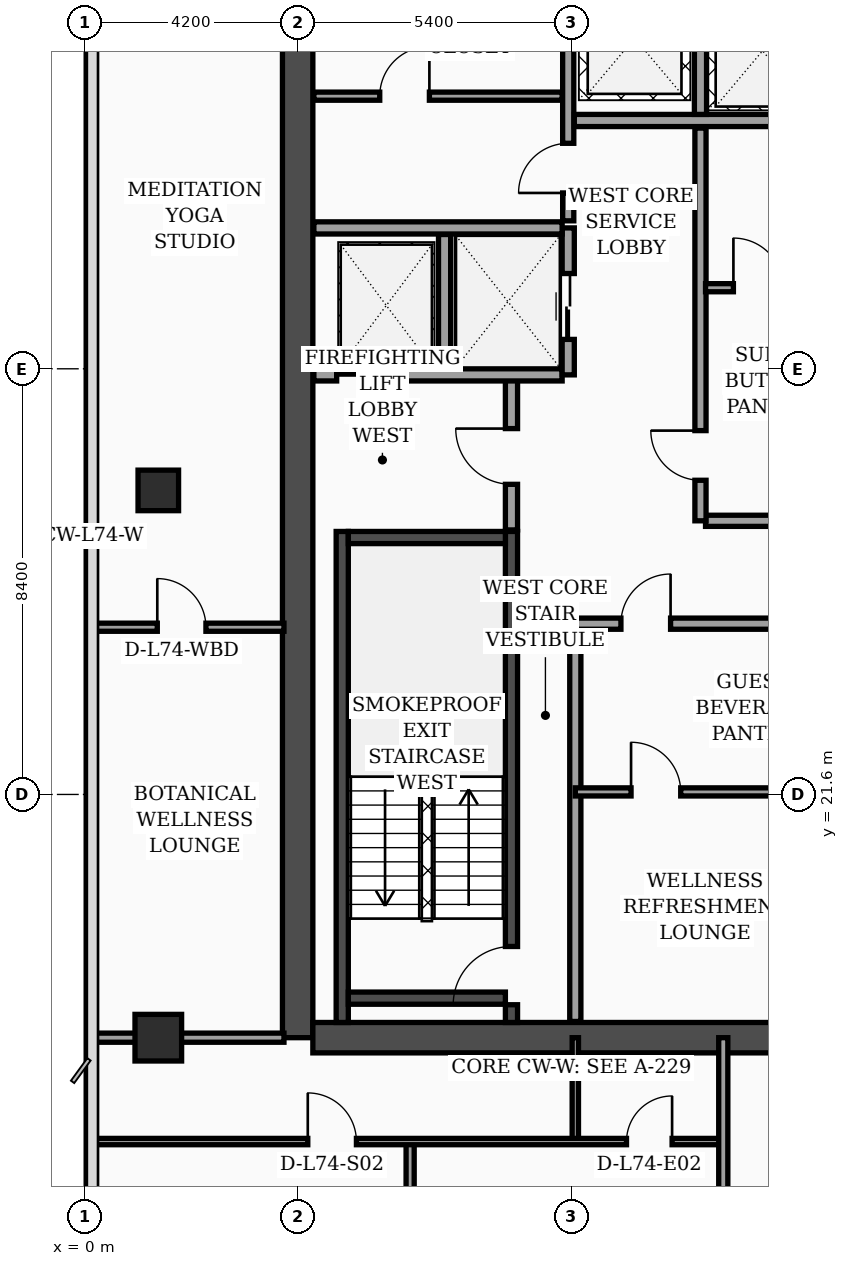
"""IFC4 building model, lengths in metres.
Left out: names, types, materials, properties, quantities, classifications, styles, units other than length and angle.
Written with IfcOpenShell. Run it as: python <this file> out.ifc"""

import sys

from ifc_helpers import new_model, si_unit, direction, frame, frame_2d, origin, origin_2d, place, context, subcontext, project, spatial, rectangle, extrude, element, fill, save


model = new_model("IFC4")
c1 = context("Model", 3, precision=1e-05, world=origin(), true_north=direction((0.0, 1.0)))
c2 = subcontext(c1, "Body", "Model", "MODEL_VIEW")
j1 = project(units=[si_unit("LENGTHUNIT", "METRE"), si_unit("PLANEANGLEUNIT", "RADIAN")], contexts=[c1])
p1 = place(None, origin())
s1 = spatial("IfcSite", under=j1, at=p1, CompositionType="ELEMENT")
p2 = place(p1, origin())
s2 = spatial("IfcBuilding", under=s1, at=p2, CompositionType="ELEMENT")
p3 = place(p2, frame((0.0, 0.0, 298.7)))
s3 = spatial("IfcBuildingStorey", under=s2, at=p3, CompositionType="ELEMENT", Elevation=298.7)
p4 = place(p3, frame((4.2, 16.8, 0.0), z_axis=(0.0, 0.0, 1.0), x_axis=(0.0, 1.0, 0.0)))
e1 = element("IfcWall", 1, at=p4, inside=s3, PredefinedType="SHEAR", context=c2, shape_type="SweptSolid", body=[
    extrude(rectangle(XDim=21.6, YDim=0.6, at=frame_2d((10.8, 0.0))), origin(), (0.0, 0.0, 1.0), 3.56),
])
p5 = place(p3, frame((4.5, 16.8, 0.0), z_axis=(0.0, 0.0, 1.0), x_axis=(1.0, 0.0, 0.0)))
e2 = element("IfcWall", 2, at=p5, inside=s3, PredefinedType="SHEAR", context=c2, shape_type="SweptSolid", body=[
    extrude(rectangle(XDim=10.2, YDim=0.6, at=frame_2d((5.1, 0.0))), origin(), (0.0, 0.0, 1.0), 3.56),
])
p6 = place(p3, frame((5.08, 17.1, 0.0), z_axis=(0.0, 0.0, 1.0), x_axis=(0.0, 1.0, 0.0)))
e3 = element("IfcWall", 3, at=p6, inside=s3, PredefinedType="SOLIDWALL", context=c2, shape_type="SweptSolid", body=[
    extrude(rectangle(XDim=9.69, YDim=0.24, at=frame_2d((4.845, 0.0))), origin(), (0.0, 0.0, 1.0), 3.56),
])
p7 = place(p3, frame((8.42, 17.1, 0.0), z_axis=(0.0, 0.0, 1.0), x_axis=(0.0, 1.0, 0.0)))
e4 = element("IfcWall", 4, at=p7, inside=s3, PredefinedType="SOLIDWALL", context=c2, shape_type="SweptSolid", body=[
    extrude(rectangle(XDim=9.69, YDim=0.24, at=frame_2d((4.845, 0.0))), origin(), (0.0, 0.0, 1.0), 3.56),
])
p8 = place(p7, frame((0.35, 0.0, 0.0)))
e5 = element("IfcOpeningElement", 5, at=p8, cuts=e4, PredefinedType="OPENING", context=c2, shape_type="SweptSolid", body=[
    extrude(rectangle(XDim=1.15, YDim=2.2, at=frame_2d((0.575, 1.1))), frame((0.0, 0.13, 0.0), z_axis=(0.0, -1.0, 0.0), x_axis=(1.0, 0.0, 0.0)), (0.0, 0.0, 1.0), 0.26),
])
for number, where, z_axis, x_axis in (
    (6, (5.2, 17.58, 0.0), (0.0, 0.0, 1.0), (1.0, 0.0, 0.0)),
    (7, (5.2, 26.67, 0.0), (0.0, 0.0, 1.0), (1.0, 0.0, 0.0)),
):
    element("IfcWall", number, at=place(p3, frame(where, z_axis=z_axis, x_axis=x_axis)), inside=s3, PredefinedType="SOLIDWALL", context=c2, shape_type="SweptSolid", body=[
        extrude(rectangle(XDim=3.1, YDim=0.24, at=frame_2d((1.55, 0.0))), origin(), (0.0, 0.0, 1.0), 3.56),
    ])
p9 = place(p3, frame((1.45, 16.8, 0.0), z_axis=(0.0, 0.0, 1.0), x_axis=(1.0, 0.0, 0.0)))
e8 = element("IfcColumn", 8, at=p9, inside=s3, PredefinedType="COLUMN", context=c2, shape_type="SweptSolid", body=[
    extrude(rectangle(XDim=0.92, YDim=0.92, at=origin_2d()), origin(), (0.0, 0.0, 1.0), 3.56),
])
p10 = place(p3, frame((1.45, 27.6, 0.0), z_axis=(0.0, 0.0, 1.0), x_axis=(1.0, 0.0, 0.0)))
e9 = element("IfcColumn", 9, at=p10, inside=s3, PredefinedType="COLUMN", context=c2, shape_type="SweptSolid", body=[
    extrude(rectangle(XDim=0.8, YDim=0.8, at=origin_2d()), origin(), (0.0, 0.0, 1.0), 3.56),
])
p11 = place(p3, frame((8.42, 26.82, 0.0), z_axis=(0.0, 0.0, 1.0), x_axis=(0.0, 1.0, 0.0)))
e10 = element("IfcWall", 10, at=p11, inside=s3, PredefinedType="SOLIDWALL", context=c2, shape_type="SweptSolid", body=[
    extrude(rectangle(XDim=3.0, YDim=0.24, at=frame_2d((1.5, 0.0))), origin(), (0.0, 0.0, 1.0), 3.56),
])
p12 = place(p11, frame((0.9, 0.0, 0.0)))
e11 = element("IfcOpeningElement", 11, at=p12, cuts=e10, PredefinedType="OPENING", context=c2, shape_type="SweptSolid", body=[
    extrude(rectangle(XDim=1.1, YDim=2.2, at=frame_2d((0.55, 1.1))), frame((0.0, 0.13, 0.0), z_axis=(0.0, -1.0, 0.0), x_axis=(1.0, 0.0, 0.0)), (0.0, 0.0, 1.0), 0.26),
])
p13 = place(p3, frame((4.52, 29.88, 0.0), z_axis=(0.0, 0.0, 1.0), x_axis=(1.0, 0.0, 0.0)))
e12 = element("IfcWall", 12, at=p13, inside=s3, PredefinedType="SOLIDWALL", context=c2, shape_type="SweptSolid", body=[
    extrude(rectangle(XDim=4.9, YDim=0.24, at=frame_2d((2.45, 0.0))), origin(), (0.0, 0.0, 1.0), 3.56),
])
p14 = place(p13, frame((0.45, 0.0, 0.0)))
e13 = element("IfcOpeningElement", 13, at=p14, cuts=e12, PredefinedType="OPENING", context=c2, shape_type="SweptSolid", body=[
    extrude(rectangle(XDim=1.3, YDim=2.35, at=frame_2d((0.65, 1.175))), frame((0.0, 0.13, 0.0), z_axis=(0.0, -1.0, 0.0), x_axis=(1.0, 0.0, 0.0)), (0.0, 0.0, 1.0), 0.26),
])
p15 = place(p3, frame((7.1, 30.02, 0.0), z_axis=(0.0, 0.0, 1.0), x_axis=(0.0, 1.0, 0.0)))
e14 = element("IfcWall", 14, at=p15, inside=s3, PredefinedType="SOLIDWALL", context=c2, shape_type="SweptSolid", body=[
    extrude(rectangle(XDim=2.63, YDim=0.24, at=frame_2d((1.315, 0.0))), origin(), (0.0, 0.0, 1.0), 3.56),
])
p16 = place(p3, frame((9.54, 29.88, 0.0), z_axis=(0.0, 0.0, 1.0), x_axis=(0.0, 1.0, 0.0)))
e15 = element("IfcWall", 15, at=p16, inside=s3, PredefinedType="SOLIDWALL", context=c2, shape_type="SweptSolid", body=[
    extrude(rectangle(XDim=2.9, YDim=0.24, at=frame_2d((1.45, 0.0))), origin(), (0.0, 0.0, 1.0), 3.56),
])
p17 = place(p16, frame((0.7, 0.0, 0.0)))
e16 = element("IfcOpeningElement", 16, at=p17, cuts=e15, PredefinedType="OPENING", context=c2, shape_type="SweptSolid", body=[
    extrude(rectangle(XDim=1.3, YDim=2.35, at=frame_2d((0.65, 1.175))), frame((0.0, 0.13, 0.0), z_axis=(0.0, -1.0, 0.0), x_axis=(1.0, 0.0, 0.0)), (0.0, 0.0, 1.0), 0.26),
])
p18 = place(p3, frame((4.52, 32.78, 0.0), z_axis=(0.0, 0.0, 1.0), x_axis=(1.0, 0.0, 0.0)))
e17 = element("IfcWall", 17, at=p18, inside=s3, PredefinedType="SOLIDWALL", context=c2, shape_type="SweptSolid", body=[
    extrude(rectangle(XDim=4.9, YDim=0.24, at=frame_2d((2.45, 0.0))), origin(), (0.0, 0.0, 1.0), 3.19),
])
p19 = place(p3, frame((9.68, 17.12, 0.0), z_axis=(0.0, 0.0, 1.0), x_axis=(0.0, 1.0, 0.0)))
e18 = element("IfcWall", 18, at=p19, inside=s3, PredefinedType="SOLIDWALL", context=c2, shape_type="SweptSolid", body=[
    extrude(rectangle(XDim=7.88, YDim=0.22, at=frame_2d((3.94, 0.0))), origin(), (0.0, 0.0, 1.0), 3.56),
])
p20 = place(p3, frame((4.52, 35.38, 0.0), z_axis=(0.0, 0.0, 1.0), x_axis=(1.0, 0.0, 0.0)))
e19 = element("IfcWall", 19, at=p20, inside=s3, PredefinedType="PARTITIONING", context=c2, shape_type="SweptSolid", body=[
    extrude(rectangle(XDim=4.9, YDim=0.16, at=frame_2d((2.45, 0.0))), origin(), (0.0, 0.0, 1.0), 3.56),
])
p21 = place(p20, frame((1.3, 0.0, 0.0)))
e20 = element("IfcOpeningElement", 20, at=p21, cuts=e19, PredefinedType="OPENING", context=c2, shape_type="SweptSolid", body=[
    extrude(rectangle(XDim=0.98, YDim=2.15, at=frame_2d((0.49, 1.075))), frame((0.0, 0.09, 0.0), z_axis=(0.0, -1.0, 0.0), x_axis=(1.0, 0.0, 0.0)), (0.0, 0.0, 1.0), 0.18),
])
p22 = place(p3, frame((9.54, 32.92, 0.0), z_axis=(0.0, 0.0, 1.0), x_axis=(0.0, 1.0, 0.0)))
e21 = element("IfcWall", 21, at=p22, inside=s3, PredefinedType="SOLIDWALL", context=c2, shape_type="SweptSolid", body=[
    extrude(rectangle(XDim=5.16, YDim=0.22, at=frame_2d((2.58, 0.0))), origin(), (0.0, 0.0, 1.0), 3.56),
])
p23 = place(p22, frame((0.55, 0.0, 0.0)))
e22 = element("IfcOpeningElement", 22, at=p23, cuts=e21, PredefinedType="OPENING", context=c2, shape_type="SweptSolid", body=[
    extrude(rectangle(XDim=0.98, YDim=2.15, at=frame_2d((0.49, 1.075))), frame((0.0, 0.12, 0.0), z_axis=(0.0, -1.0, 0.0), x_axis=(1.0, 0.0, 0.0)), (0.0, 0.0, 1.0), 0.24),
])
p24 = place(p3, frame((9.68, 21.65, 0.0), z_axis=(0.0, 0.0, 1.0), x_axis=(1.0, 0.0, 0.0)))
e23 = element("IfcWall", 23, at=p24, inside=s3, PredefinedType="PARTITIONING", context=c2, shape_type="SweptSolid", body=[
    extrude(rectangle(XDim=5.0, YDim=0.16, at=frame_2d((2.5, 0.0))), origin(), (0.0, 0.0, 1.0), 3.09),
])
p25 = place(p24, frame((1.1, 0.0, 0.0)))
e24 = element("IfcOpeningElement", 24, at=p25, cuts=e23, PredefinedType="OPENING", context=c2, shape_type="SweptSolid", body=[
    extrude(rectangle(XDim=0.98, YDim=2.15, at=frame_2d((0.49, 1.075))), frame((0.0, 0.09, 0.0), z_axis=(0.0, -1.0, 0.0), x_axis=(1.0, 0.0, 0.0)), (0.0, 0.0, 1.0), 0.18),
])
p26 = place(p3, frame((9.68, 24.97, 0.0), z_axis=(0.0, 0.0, 1.0), x_axis=(1.0, 0.0, 0.0)))
e25 = element("IfcWall", 25, at=p26, inside=s3, PredefinedType="SOLIDWALL", context=c2, shape_type="SweptSolid", body=[
    extrude(rectangle(XDim=5.0, YDim=0.22, at=frame_2d((2.5, 0.0))), origin(), (0.0, 0.0, 1.0), 2.99),
])
p27 = place(p26, frame((0.9, 0.0, 0.0)))
e26 = element("IfcOpeningElement", 26, at=p27, cuts=e25, PredefinedType="OPENING", context=c2, shape_type="SweptSolid", body=[
    extrude(rectangle(XDim=0.98, YDim=2.15, at=frame_2d((0.49, 1.075))), frame((0.0, 0.12, 0.0), z_axis=(0.0, -1.0, 0.0), x_axis=(1.0, 0.0, 0.0)), (0.0, 0.0, 1.0), 0.24),
])
p28 = place(p3, frame((12.25, 27.0, 0.0), z_axis=(0.0, 0.0, 1.0), x_axis=(1.0, 0.0, 0.0)))
e27 = element("IfcWall", 27, at=p28, inside=s3, PredefinedType="SOLIDWALL", context=c2, shape_type="SweptSolid", body=[
    extrude(rectangle(XDim=2.43, YDim=0.22, at=frame_2d((1.215, 0.0))), origin(), (0.0, 0.0, 1.0), 3.56),
])
p29 = place(p3, frame((12.15, 27.0, 0.0), z_axis=(0.0, 0.0, 1.0), x_axis=(0.0, 1.0, 0.0)))
e28 = element("IfcWall", 28, at=p29, inside=s3, PredefinedType="SOLIDWALL", context=c2, shape_type="SweptSolid", body=[
    extrude(rectangle(XDim=7.75, YDim=0.22, at=frame_2d((3.875, 0.0))), origin(), (0.0, 0.0, 1.0), 3.56),
])
p30 = place(p29, frame((0.8, 0.0, 0.0)))
e29 = element("IfcOpeningElement", 29, at=p30, cuts=e28, PredefinedType="OPENING", context=c2, shape_type="SweptSolid", body=[
    extrude(rectangle(XDim=0.98, YDim=2.15, at=frame_2d((0.49, 1.075))), frame((0.0, 0.12, 0.0), z_axis=(0.0, -1.0, 0.0), x_axis=(1.0, 0.0, 0.0)), (0.0, 0.0, 1.0), 0.24),
])
p31 = place(p3, frame((12.25, 31.6, 0.0), z_axis=(0.0, 0.0, 1.0), x_axis=(1.0, 0.0, 0.0)))
e30 = element("IfcWall", 30, at=p31, inside=s3, PredefinedType="PARTITIONING", context=c2, shape_type="SweptSolid", body=[
    extrude(rectangle(XDim=2.43, YDim=0.16, at=frame_2d((1.215, 0.0))), origin(), (0.0, 0.0, 1.0), 3.14),
])
p32 = place(p31, frame((0.55, 0.0, 0.0)))
e31 = element("IfcOpeningElement", 31, at=p32, cuts=e30, PredefinedType="OPENING", context=c2, shape_type="SweptSolid", body=[
    extrude(rectangle(XDim=0.98, YDim=2.15, at=frame_2d((0.49, 1.075))), frame((0.0, 0.09, 0.0), z_axis=(0.0, -1.0, 0.0), x_axis=(1.0, 0.0, 0.0)), (0.0, 0.0, 1.0), 0.18),
])
p33 = place(p3, frame((9.66, 34.9, 0.0), z_axis=(0.0, 0.0, 1.0), x_axis=(1.0, 0.0, 0.0)))
e32 = element("IfcWall", 32, at=p33, inside=s3, PredefinedType="SOLIDWALL", context=c2, shape_type="SweptSolid", body=[
    extrude(rectangle(XDim=5.02, YDim=0.24, at=frame_2d((2.51, 0.0))), origin(), (0.0, 0.0, 1.0), 3.56),
])
p34 = place(p3, frame((12.15, 35.02, 0.0), z_axis=(0.0, 0.0, 1.0), x_axis=(0.0, 1.0, 0.0)))
e33 = element("IfcWall", 33, at=p34, inside=s3, PredefinedType="SOLIDWALL", context=c2, shape_type="SweptSolid", body=[
    extrude(rectangle(XDim=3.06, YDim=0.24, at=frame_2d((1.53, 0.0))), origin(), (0.0, 0.0, 1.0), 3.56),
])
p35 = place(p3, frame((0.08, 24.9, 0.0), z_axis=(0.0, 0.0, 1.0), x_axis=(1.0, 0.0, 0.0)))
e34 = element("IfcWall", 34, at=p35, inside=s3, PredefinedType="PARTITIONING", context=c2, shape_type="SweptSolid", body=[
    extrude(rectangle(XDim=3.85, YDim=0.16, at=frame_2d((1.925, 0.0))), origin(), (0.0, 0.0, 1.0), 3.09),
])
p36 = place(p35, frame((1.35, 0.0, 0.0)))
e35 = element("IfcOpeningElement", 35, at=p36, cuts=e34, PredefinedType="OPENING", context=c2, shape_type="SweptSolid", body=[
    extrude(rectangle(XDim=0.96, YDim=2.2, at=frame_2d((0.48, 1.1))), frame((0.0, 0.09, 0.0), z_axis=(0.0, -1.0, 0.0), x_axis=(1.0, 0.0, 0.0)), (0.0, 0.0, 1.0), 0.18),
])
p37 = place(p3, frame((0.08, 16.8, 0.0), z_axis=(0.0, 0.0, 1.0), x_axis=(1.0, 0.0, 0.0)))
e36 = element("IfcWall", 36, at=p37, inside=s3, PredefinedType="PARTITIONING", context=c2, shape_type="SweptSolid", body=[
    extrude(rectangle(XDim=3.85, YDim=0.18, at=frame_2d((1.925, 0.0))), origin(), (0.0, 0.0, 1.0), 2.99),
])
p38 = place(p3, frame((9.68, 14.75, 0.0), z_axis=(0.0, 0.0, 1.0), x_axis=(0.0, 1.0, 0.0)))
e37 = element("IfcWall", 37, at=p38, inside=s3, PredefinedType="PARTITIONING", context=c2, shape_type="SweptSolid", body=[
    extrude(rectangle(XDim=2.05, YDim=0.125, at=frame_2d((1.025, 0.0))), origin(), (0.0, 0.0, 1.0), 3.56),
])
p39 = place(p3, frame((6.42, 9.85, 0.0), z_axis=(0.0, 0.0, 1.0), x_axis=(0.0, 1.0, 0.0)))
e38 = element("IfcWall", 38, at=p39, inside=s3, PredefinedType="PARTITIONING", context=c2, shape_type="SweptSolid", body=[
    extrude(rectangle(XDim=4.9, YDim=0.16, at=frame_2d((2.45, 0.0))), origin(), (0.0, 0.0, 1.0), 3.14),
])
p40 = place(p39, frame((1.97, 0.0, 0.0)))
e39 = element("IfcOpeningElement", 39, at=p40, cuts=e38, PredefinedType="OPENING", context=c2, shape_type="SweptSolid", body=[
    extrude(rectangle(XDim=0.96, YDim=2.2, at=frame_2d((0.48, 1.1))), frame((0.0, 0.09, 0.0), z_axis=(0.0, -1.0, 0.0), x_axis=(1.0, 0.0, 0.0)), (0.0, 0.0, 1.0), 0.18),
])
p41 = place(p3, frame((0.08, 14.75, 0.0), z_axis=(0.0, 0.0, 1.0), x_axis=(1.0, 0.0, 0.0)))
e40 = element("IfcWall", 40, at=p41, inside=s3, PredefinedType="PARTITIONING", context=c2, shape_type="SweptSolid", body=[
    extrude(rectangle(XDim=12.52, YDim=0.125, at=frame_2d((6.26, 0.0))), origin(), (0.0, 0.0, 1.0), 2.99),
])
p42 = place(p41, frame((4.32, 0.0, 0.0)))
e41 = element("IfcOpeningElement", 41, at=p42, cuts=e40, PredefinedType="OPENING", context=c2, shape_type="SweptSolid", body=[
    extrude(rectangle(XDim=0.96, YDim=2.2, at=frame_2d((0.48, 1.1))), frame((0.0, 0.073, 0.0), z_axis=(0.0, -1.0, 0.0), x_axis=(1.0, 0.0, 0.0)), (0.0, 0.0, 1.0), 0.145),
])
p43 = place(p41, frame((10.61, 0.0, 0.0)))
e42 = element("IfcOpeningElement", 42, at=p43, cuts=e40, PredefinedType="OPENING", context=c2, shape_type="SweptSolid", body=[
    extrude(rectangle(XDim=0.9, YDim=2.15, at=frame_2d((0.45, 1.075))), frame((0.0, 0.073, 0.0), z_axis=(0.0, -1.0, 0.0), x_axis=(1.0, 0.0, 0.0)), (0.0, 0.0, 1.0), 0.145),
])
p44 = place(p3, frame((12.6, 2.44, 0.0), z_axis=(0.0, 0.0, 1.0), x_axis=(0.0, 1.0, 0.0)))
e43 = element("IfcWall", 43, at=p44, inside=s3, PredefinedType="PARTITIONING", context=c2, shape_type="SweptSolid", body=[
    extrude(rectangle(XDim=14.36, YDim=0.18, at=frame_2d((7.18, 0.0))), origin(), (0.0, 0.0, 1.0), 2.99),
])
p45 = place(p44, frame((3.01, 0.0, 0.0)))
e44 = element("IfcOpeningElement", 44, at=p45, cuts=e43, PredefinedType="OPENING", context=c2, shape_type="SweptSolid", body=[
    extrude(rectangle(XDim=1.02, YDim=2.2, at=frame_2d((0.51, 1.1))), frame((0.0, 0.1, 0.0), z_axis=(0.0, -1.0, 0.0), x_axis=(1.0, 0.0, 0.0)), (0.0, 0.0, 1.0), 0.2),
])
p46 = place(p44, frame((9.35, 0.0, 0.0)))
e45 = element("IfcOpeningElement", 45, at=p46, cuts=e43, PredefinedType="OPENING", context=c2, shape_type="SweptSolid", body=[
    extrude(rectangle(XDim=1.02, YDim=2.2, at=frame_2d((0.51, 1.1))), frame((0.0, 0.1, 0.0), z_axis=(0.0, -1.0, 0.0), x_axis=(1.0, 0.0, 0.0)), (0.0, 0.0, 1.0), 0.2),
])
p47 = place(p12, origin())
e46 = element("IfcDoor", 46, at=p47, inside=s3, OperationType="SINGLE_SWING_RIGHT", PredefinedType="DOOR", context=c2, shape_type="SweptSolid", body=[
    extrude(rectangle(XDim=1.1, YDim=2.2, at=frame_2d((0.55, 1.1))), frame((0.0, 0.025, 0.0), z_axis=(0.0, -1.0, 0.0), x_axis=(1.0, 0.0, 0.0)), (0.0, 0.0, 1.0), 0.05),
])
fill(e11, e46)
p48 = place(p14, origin())
e47 = element("IfcDoor", 47, at=p48, inside=s3, OperationType="DOUBLE_DOOR_SLIDING", PredefinedType="DOOR", context=c2, shape_type="SweptSolid", body=[
    extrude(rectangle(XDim=1.3, YDim=2.35, at=frame_2d((0.65, 1.175))), frame((0.0, 0.025, 0.0), z_axis=(0.0, -1.0, 0.0), x_axis=(1.0, 0.0, 0.0)), (0.0, 0.0, 1.0), 0.05),
])
fill(e13, e47)
p49 = place(p17, origin())
e48 = element("IfcDoor", 48, at=p49, inside=s3, OperationType="DOUBLE_DOOR_SLIDING", PredefinedType="DOOR", context=c2, shape_type="SweptSolid", body=[
    extrude(rectangle(XDim=1.3, YDim=2.35, at=frame_2d((0.65, 1.175))), frame((0.0, 0.025, 0.0), z_axis=(0.0, -1.0, 0.0), x_axis=(1.0, 0.0, 0.0)), (0.0, 0.0, 1.0), 0.05),
])
fill(e16, e48)
p50 = place(p21, origin())
e49 = element("IfcDoor", 49, at=p50, inside=s3, OperationType="SINGLE_SWING_RIGHT", PredefinedType="DOOR", context=c2, shape_type="SweptSolid", body=[
    extrude(rectangle(XDim=0.98, YDim=2.15, at=frame_2d((0.49, 1.075))), frame((0.0, 0.025, 0.0), z_axis=(0.0, -1.0, 0.0), x_axis=(1.0, 0.0, 0.0)), (0.0, 0.0, 1.0), 0.05),
])
fill(e20, e49)
p51 = place(p23, origin())
e50 = element("IfcDoor", 50, at=p51, inside=s3, OperationType="SINGLE_SWING_LEFT", PredefinedType="DOOR", context=c2, shape_type="SweptSolid", body=[
    extrude(rectangle(XDim=0.98, YDim=2.15, at=frame_2d((0.49, 1.075))), frame((0.0, 0.025, 0.0), z_axis=(0.0, -1.0, 0.0), x_axis=(1.0, 0.0, 0.0)), (0.0, 0.0, 1.0), 0.05),
])
fill(e22, e50)
p52 = place(p25, origin())
e51 = element("IfcDoor", 51, at=p52, inside=s3, OperationType="SINGLE_SWING_LEFT", PredefinedType="DOOR", context=c2, shape_type="SweptSolid", body=[
    extrude(rectangle(XDim=0.98, YDim=2.15, at=frame_2d((0.49, 1.075))), frame((0.0, 0.025, 0.0), z_axis=(0.0, -1.0, 0.0), x_axis=(1.0, 0.0, 0.0)), (0.0, 0.0, 1.0), 0.05),
])
fill(e24, e51)
p53 = place(p27, origin())
e52 = element("IfcDoor", 52, at=p53, inside=s3, OperationType="SINGLE_SWING_RIGHT", PredefinedType="DOOR", context=c2, shape_type="SweptSolid", body=[
    extrude(rectangle(XDim=0.98, YDim=2.15, at=frame_2d((0.49, 1.075))), frame((0.0, 0.025, 0.0), z_axis=(0.0, -1.0, 0.0), x_axis=(1.0, 0.0, 0.0)), (0.0, 0.0, 1.0), 0.05),
])
fill(e26, e52)
p54 = place(p30, origin())
e53 = element("IfcDoor", 53, at=p54, inside=s3, OperationType="SINGLE_SWING_RIGHT", PredefinedType="DOOR", context=c2, shape_type="SweptSolid", body=[
    extrude(rectangle(XDim=0.98, YDim=2.15, at=frame_2d((0.49, 1.075))), frame((0.0, 0.025, 0.0), z_axis=(0.0, -1.0, 0.0), x_axis=(1.0, 0.0, 0.0)), (0.0, 0.0, 1.0), 0.05),
])
fill(e29, e53)
p55 = place(p32, origin())
e54 = element("IfcDoor", 54, at=p55, inside=s3, OperationType="SINGLE_SWING_LEFT", PredefinedType="DOOR", context=c2, shape_type="SweptSolid", body=[
    extrude(rectangle(XDim=0.98, YDim=2.15, at=frame_2d((0.49, 1.075))), frame((0.0, 0.025, 0.0), z_axis=(0.0, -1.0, 0.0), x_axis=(1.0, 0.0, 0.0)), (0.0, 0.0, 1.0), 0.05),
])
fill(e31, e54)
p56 = place(p36, origin())
e55 = element("IfcDoor", 55, at=p56, inside=s3, OperationType="SINGLE_SWING_LEFT", PredefinedType="DOOR", context=c2, shape_type="SweptSolid", body=[
    extrude(rectangle(XDim=0.96, YDim=2.2, at=frame_2d((0.48, 1.1))), frame((0.0, 0.025, 0.0), z_axis=(0.0, -1.0, 0.0), x_axis=(1.0, 0.0, 0.0)), (0.0, 0.0, 1.0), 0.05),
])
fill(e35, e55)
p57 = place(p42, origin())
e56 = element("IfcDoor", 56, at=p57, inside=s3, OperationType="SINGLE_SWING_LEFT", PredefinedType="DOOR", context=c2, shape_type="SweptSolid", body=[
    extrude(rectangle(XDim=0.96, YDim=2.2, at=frame_2d((0.48, 1.1))), frame((0.0, 0.025, 0.0), z_axis=(0.0, -1.0, 0.0), x_axis=(1.0, 0.0, 0.0)), (0.0, 0.0, 1.0), 0.05),
])
fill(e41, e56)
p58 = place(p43, origin())
e57 = element("IfcDoor", 57, at=p58, inside=s3, OperationType="SINGLE_SWING_RIGHT", PredefinedType="DOOR", context=c2, shape_type="SweptSolid", body=[
    extrude(rectangle(XDim=0.9, YDim=2.15, at=frame_2d((0.45, 1.075))), frame((0.0, 0.025, 0.0), z_axis=(0.0, -1.0, 0.0), x_axis=(1.0, 0.0, 0.0)), (0.0, 0.0, 1.0), 0.05),
])
fill(e42, e57)
p59 = place(p8, origin())
e58 = element("IfcDoor", 58, at=p59, inside=s3, OperationType="SINGLE_SWING_LEFT", PredefinedType="DOOR", context=c2, shape_type="SweptSolid", body=[
    extrude(rectangle(XDim=1.15, YDim=2.2, at=frame_2d((0.575, 1.1))), frame((0.0, 0.025, 0.0), z_axis=(0.0, -1.0, 0.0), x_axis=(1.0, 0.0, 0.0)), (0.0, 0.0, 1.0), 0.05),
])
fill(e5, e58)
save(model, sys.argv[1])
